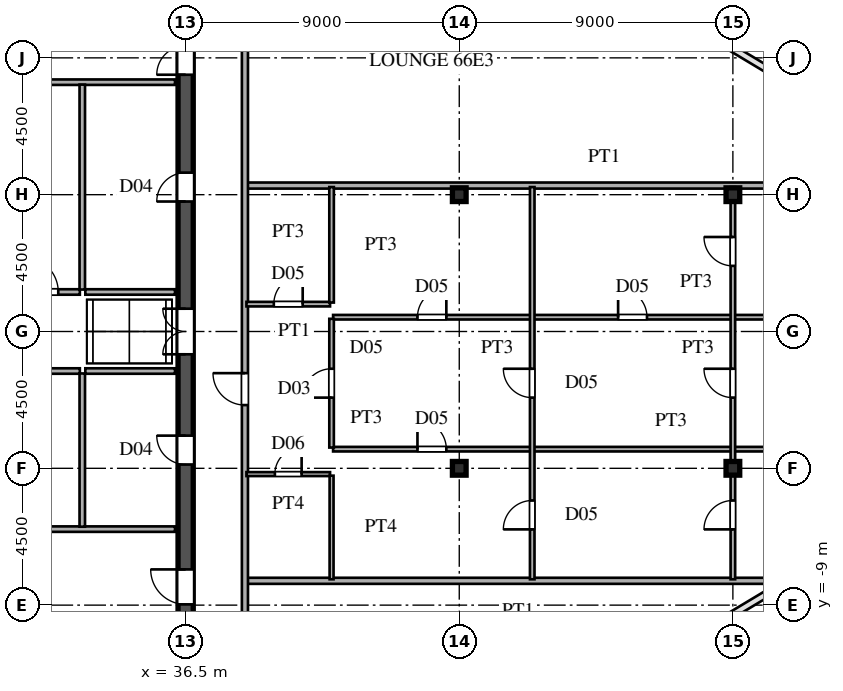
"""IFC4 building model, lengths in metres.
Left out: names, types, materials, properties, quantities, classifications, styles, units other than length and angle.
Written with IfcOpenShell. Run it as: python <this file> out.ifc"""

import sys

from ifc_helpers import new_model, si_unit, direction, frame, frame_2d, origin, origin_2d, place, context, subcontext, project, spatial, rectangle, i_section, extrude, source, transform, mapped, element, fill, save


model = new_model("IFC4")
c1 = context("Model", 3, precision=1e-05, world=origin(), true_north=direction((0.0, 1.0)))
c2 = subcontext(c1, "Body", "Model", "MODEL_VIEW")
j1 = project(units=[si_unit("LENGTHUNIT", "METRE"), si_unit("PLANEANGLEUNIT", "RADIAN")], contexts=[c1])
p1 = place(None, origin())
s1 = spatial("IfcSite", under=j1, at=p1, CompositionType="ELEMENT")
p2 = place(p1, origin())
s2 = spatial("IfcBuilding", under=s1, at=p2, CompositionType="ELEMENT")
p3 = place(p2, frame((0.0, 0.0, 250.65)))
s3 = spatial("IfcBuildingStorey", under=s2, at=p3, CompositionType="ELEMENT", Elevation=250.65)
m1 = source(origin(), c2, "Body", "SweptSolid", [
    extrude(i_section(OverallWidth=0.45, OverallDepth=0.45, WebThickness=0.016, FlangeThickness=0.025, at=origin_2d()), origin(), (0.0, 0.0, 1.0), 3.75),
])
for number, where, z_axis, x_axis in (
    (1, (45.5, -4.5, 0.0), (0.0, 0.0, 1.0), (1.0, 0.0, 0.0)),
    (2, (45.5, 4.5, 0.0), (0.0, 0.0, 1.0), (1.0, 0.0, 0.0)),
    (3, (54.5, -4.5, 0.0), (0.0, 0.0, 1.0), (1.0, 0.0, 0.0)),
    (4, (54.5, 4.5, 0.0), (0.0, 0.0, 1.0), (1.0, 0.0, 0.0)),
):
    element("IfcColumn", number, at=place(p3, frame(where, z_axis=z_axis, x_axis=x_axis)), inside=s3, PredefinedType="COLUMN", context=c2, shape_type="MappedRepresentation", body=[
        mapped(m1, transform((0.0, 0.0, 0.0), scale=1.0)),
    ])
p4 = place(p3, frame((36.5, -13.65, 0.0), z_axis=(0.0, 0.0, 1.0), x_axis=(0.0, 1.0, 0.0)))
e5 = element("IfcWall", 5, at=p4, inside=s3, PredefinedType="SHEAR", context=c2, shape_type="SweptSolid", body=[
    extrude(rectangle(XDim=7.15, YDim=0.5, at=frame_2d((3.575, 0.0))), origin(), (0.0, 0.0, 1.0), 3.53),
])
p5 = place(p4, frame((4.675, 0.0, 0.0)))
e6 = element("IfcOpeningElement", 6, at=p5, cuts=e5, PredefinedType="OPENING", context=c2, shape_type="SweptSolid", body=[
    extrude(rectangle(XDim=1.15, YDim=2.2, at=frame_2d((0.575, 1.1))), frame((0.0, 0.26, 0.0), z_axis=(0.0, -1.0, 0.0), x_axis=(1.0, 0.0, 0.0)), (0.0, 0.0, 1.0), 0.52),
])
p6 = place(p3, frame((36.5, -1.3, 0.0), z_axis=(0.0, 0.0, 1.0), x_axis=(0.0, 1.0, 0.0)))
e7 = element("IfcWall", 7, at=p6, inside=s3, PredefinedType="SHEAR", context=c2, shape_type="SweptSolid", body=[
    extrude(rectangle(XDim=2.6, YDim=0.5, at=frame_2d((1.3, 0.0))), origin(), (0.0, 0.0, 1.0), 3.53),
])
p7 = place(p6, frame((0.55, 0.0, 0.0)))
e8 = element("IfcOpeningElement", 8, at=p7, cuts=e7, PredefinedType="OPENING", context=c2, shape_type="SweptSolid", body=[
    extrude(rectangle(XDim=1.5, YDim=2.3, at=frame_2d((0.75, 1.15))), frame((0.0, 0.26, 0.0), z_axis=(0.0, -1.0, 0.0), x_axis=(1.0, 0.0, 0.0)), (0.0, 0.0, 1.0), 0.52),
])
p8 = place(p3, frame((36.5, 8.2, 0.0), z_axis=(0.0, 0.0, 1.0), x_axis=(0.0, 1.0, 0.0)))
e9 = element("IfcWall", 9, at=p8, inside=s3, PredefinedType="SHEAR", context=c2, shape_type="SweptSolid", body=[
    extrude(rectangle(XDim=5.45, YDim=0.5, at=frame_2d((2.725, 0.0))), origin(), (0.0, 0.0, 1.0), 3.53),
])
p9 = place(p8, frame((0.245, 0.0, 0.0)))
e10 = element("IfcOpeningElement", 10, at=p9, cuts=e9, PredefinedType="OPENING", context=c2, shape_type="SweptSolid", body=[
    extrude(rectangle(XDim=0.95, YDim=2.15, at=frame_2d((0.475, 1.075))), frame((0.0, 0.26, 0.0), z_axis=(0.0, -1.0, 0.0), x_axis=(1.0, 0.0, 0.0)), (0.0, 0.0, 1.0), 0.52),
])
p10 = place(p3, frame((36.5, -6.5, 0.0), z_axis=(0.0, 0.0, 1.0), x_axis=(0.0, 1.0, 0.0)))
e11 = element("IfcWall", 11, at=p10, inside=s3, PredefinedType="SHEAR", context=c2, shape_type="SweptSolid", body=[
    extrude(rectangle(XDim=5.2, YDim=0.5, at=frame_2d((2.6, 0.0))), origin(), (0.0, 0.0, 1.0), 3.53),
])
p11 = place(p10, frame((2.125, 0.0, 0.0)))
e12 = element("IfcOpeningElement", 12, at=p11, cuts=e11, PredefinedType="OPENING", context=c2, shape_type="SweptSolid", body=[
    extrude(rectangle(XDim=0.95, YDim=2.15, at=frame_2d((0.475, 1.075))), frame((0.0, 0.26, 0.0), z_axis=(0.0, -1.0, 0.0), x_axis=(1.0, 0.0, 0.0)), (0.0, 0.0, 1.0), 0.52),
])
p12 = place(p3, frame((36.5, 1.3, 0.0), z_axis=(0.0, 0.0, 1.0), x_axis=(0.0, 1.0, 0.0)))
e13 = element("IfcWall", 13, at=p12, inside=s3, PredefinedType="SHEAR", context=c2, shape_type="SweptSolid", body=[
    extrude(rectangle(XDim=6.9, YDim=0.5, at=frame_2d((3.45, 0.0))), origin(), (0.0, 0.0, 1.0), 3.53),
])
p13 = place(p12, frame((2.975, 0.0, 0.0)))
e14 = element("IfcOpeningElement", 14, at=p13, cuts=e13, PredefinedType="OPENING", context=c2, shape_type="SweptSolid", body=[
    extrude(rectangle(XDim=0.95, YDim=2.15, at=frame_2d((0.475, 1.075))), frame((0.0, 0.26, 0.0), z_axis=(0.0, -1.0, 0.0), x_axis=(1.0, 0.0, 0.0)), (0.0, 0.0, 1.0), 0.52),
])
for number, where, z_axis, x_axis in (
    (15, (30.45, -6.5, 0.0), (0.0, 0.0, 1.0), (1.0, 0.0, 0.0)),
    (16, (30.45, 8.2, 0.0), (0.0, 0.0, 1.0), (1.0, 0.0, 0.0)),
):
    element("IfcWall", number, at=place(p3, frame(where, z_axis=z_axis, x_axis=x_axis)), inside=s3, PredefinedType="PARTITIONING", context=c2, shape_type="SweptSolid", body=[
        extrude(rectangle(XDim=5.7, YDim=0.18, at=frame_2d((2.85, 0.0))), origin(), (0.0, 0.0, 1.0), 3.53),
    ])
p14 = place(p3, frame((33.1, -6.42, 0.0), z_axis=(0.0, 0.0, 1.0), x_axis=(0.0, 1.0, 0.0)))
e17 = element("IfcWall", 17, at=p14, inside=s3, PredefinedType="PARTITIONING", context=c2, shape_type="SweptSolid", body=[
    extrude(rectangle(XDim=5.04, YDim=0.18, at=frame_2d((2.52, 0.0))), origin(), (0.0, 0.0, 1.0), 3.53),
])
p15 = place(p3, frame((33.1, 1.38, 0.0), z_axis=(0.0, 0.0, 1.0), x_axis=(0.0, 1.0, 0.0)))
e18 = element("IfcWall", 18, at=p15, inside=s3, PredefinedType="PARTITIONING", context=c2, shape_type="SweptSolid", body=[
    extrude(rectangle(XDim=6.74, YDim=0.18, at=frame_2d((3.37, 0.0))), origin(), (0.0, 0.0, 1.0), 3.53),
])
p16 = place(p3, frame((27.85, -1.3, 0.0), z_axis=(0.0, 0.0, 1.0), x_axis=(1.0, 0.0, 0.0)))
e19 = element("IfcWall", 19, at=p16, inside=s3, PredefinedType="PARTITIONING", context=c2, shape_type="SweptSolid", body=[
    extrude(rectangle(XDim=5.17, YDim=0.18, at=frame_2d((2.585, 0.0))), origin(), (0.0, 0.0, 1.0), 3.53),
])
p17 = place(p16, frame((2.01, 0.0, 0.0)))
e20 = element("IfcOpeningElement", 20, at=p17, cuts=e19, PredefinedType="OPENING", context=c2, shape_type="SweptSolid", body=[
    extrude(rectangle(XDim=1.15, YDim=2.2, at=frame_2d((0.575, 1.1))), frame((0.0, 0.1, 0.0), z_axis=(0.0, -1.0, 0.0), x_axis=(1.0, 0.0, 0.0)), (0.0, 0.0, 1.0), 0.2),
])
p18 = place(p3, frame((30.45, 1.3, 0.0), z_axis=(0.0, 0.0, 1.0), x_axis=(1.0, 0.0, 0.0)))
e21 = element("IfcWall", 21, at=p18, inside=s3, PredefinedType="PARTITIONING", context=c2, shape_type="SweptSolid", body=[
    extrude(rectangle(XDim=2.57, YDim=0.18, at=frame_2d((1.285, 0.0))), origin(), (0.0, 0.0, 1.0), 3.53),
])
p19 = place(p18, frame((0.71, 0.0, 0.0)))
e22 = element("IfcOpeningElement", 22, at=p19, cuts=e21, PredefinedType="OPENING", context=c2, shape_type="SweptSolid", body=[
    extrude(rectangle(XDim=1.15, YDim=2.2, at=frame_2d((0.575, 1.1))), frame((0.0, 0.1, 0.0), z_axis=(0.0, -1.0, 0.0), x_axis=(1.0, 0.0, 0.0)), (0.0, 0.0, 1.0), 0.2),
])
for number, where, z_axis, x_axis in (
    (23, (33.2, -1.3, 0.0), (0.0, 0.0, 1.0), (1.0, 0.0, 0.0)),
    (24, (33.2, 1.3, 0.0), (0.0, 0.0, 1.0), (1.0, 0.0, 0.0)),
):
    element("IfcWall", number, at=place(p3, frame(where, z_axis=z_axis, x_axis=x_axis)), inside=s3, PredefinedType="PARTITIONING", context=c2, shape_type="SweptSolid", body=[
        extrude(rectangle(XDim=2.95, YDim=0.18, at=frame_2d((1.475, 0.0))), origin(), (0.0, 0.0, 1.0), 3.53),
    ])
p20 = place(p3, frame((38.53, -8.2, 0.0), z_axis=(0.0, 0.0, 1.0), x_axis=(1.0, 0.0, 0.0)))
e25 = element("IfcWall", 25, at=p20, inside=s3, PredefinedType="PARTITIONING", context=c2, shape_type="SweptSolid", body=[
    extrude(rectangle(XDim=17.813, YDim=0.2, at=frame_2d((8.906, 0.0))), origin(), (0.0, 0.0, 1.0), 3.53),
])
p21 = place(p3, frame((38.5, -4.69, 0.0), z_axis=(0.0, 0.0, 1.0), x_axis=(1.0, 0.0, 0.0)))
e26 = element("IfcWall", 26, at=p21, inside=s3, PredefinedType="PARTITIONING", context=c2, shape_type="SweptSolid", body=[
    extrude(rectangle(XDim=2.75, YDim=0.13, at=frame_2d((1.375, 0.0))), origin(), (0.0, 0.0, 1.0), 3.53),
])
p22 = place(p21, frame((0.935, 0.0, 0.0)))
e27 = element("IfcOpeningElement", 27, at=p22, cuts=e26, PredefinedType="OPENING", context=c2, shape_type="SweptSolid", body=[
    extrude(rectangle(XDim=0.88, YDim=2.1, at=frame_2d((0.44, 1.05))), frame((0.0, 0.075, 0.0), z_axis=(0.0, -1.0, 0.0), x_axis=(1.0, 0.0, 0.0)), (0.0, 0.0, 1.0), 0.15),
])
p23 = place(p3, frame((41.35, -3.87, 0.0), z_axis=(0.0, 0.0, 1.0), x_axis=(1.0, 0.0, 0.0)))
e28 = element("IfcWall", 28, at=p23, inside=s3, PredefinedType="PARTITIONING", context=c2, shape_type="SweptSolid", body=[
    extrude(rectangle(XDim=22.24, YDim=0.15, at=frame_2d((11.12, 0.0))), origin(), (0.0, 0.0, 1.0), 3.53),
])
p24 = place(p23, frame((2.775, 0.0, 0.0)))
e29 = element("IfcOpeningElement", 29, at=p24, cuts=e28, PredefinedType="OPENING", context=c2, shape_type="SweptSolid", body=[
    extrude(rectangle(XDim=0.95, YDim=2.15, at=frame_2d((0.475, 1.075))), frame((0.0, 0.085, 0.0), z_axis=(0.0, -1.0, 0.0), x_axis=(1.0, 0.0, 0.0)), (0.0, 0.0, 1.0), 0.17),
])
p25 = place(p3, frame((41.35, 0.47, 0.0), z_axis=(0.0, 0.0, 1.0), x_axis=(1.0, 0.0, 0.0)))
e30 = element("IfcWall", 30, at=p25, inside=s3, PredefinedType="PARTITIONING", context=c2, shape_type="SweptSolid", body=[
    extrude(rectangle(XDim=26.185, YDim=0.15, at=frame_2d((13.092, 0.0))), origin(), (0.0, 0.0, 1.0), 3.53),
])
p26 = place(p25, frame((2.775, 0.0, 0.0)))
e31 = element("IfcOpeningElement", 31, at=p26, cuts=e30, PredefinedType="OPENING", context=c2, shape_type="SweptSolid", body=[
    extrude(rectangle(XDim=0.95, YDim=2.15, at=frame_2d((0.475, 1.075))), frame((0.0, 0.085, 0.0), z_axis=(0.0, -1.0, 0.0), x_axis=(1.0, 0.0, 0.0)), (0.0, 0.0, 1.0), 0.17),
])
p27 = place(p25, frame((9.375, 0.0, 0.0)))
e32 = element("IfcOpeningElement", 32, at=p27, cuts=e30, PredefinedType="OPENING", context=c2, shape_type="SweptSolid", body=[
    extrude(rectangle(XDim=0.95, YDim=2.15, at=frame_2d((0.475, 1.075))), frame((0.0, 0.085, 0.0), z_axis=(0.0, -1.0, 0.0), x_axis=(1.0, 0.0, 0.0)), (0.0, 0.0, 1.0), 0.17),
])
p28 = place(p3, frame((38.5, 0.9, 0.0), z_axis=(0.0, 0.0, 1.0), x_axis=(1.0, 0.0, 0.0)))
e33 = element("IfcWall", 33, at=p28, inside=s3, PredefinedType="PARTITIONING", context=c2, shape_type="SweptSolid", body=[
    extrude(rectangle(XDim=2.75, YDim=0.15, at=frame_2d((1.375, 0.0))), origin(), (0.0, 0.0, 1.0), 3.53),
])
p29 = place(p28, frame((0.9, 0.0, 0.0)))
e34 = element("IfcOpeningElement", 34, at=p29, cuts=e33, PredefinedType="OPENING", context=c2, shape_type="SweptSolid", body=[
    extrude(rectangle(XDim=0.95, YDim=2.15, at=frame_2d((0.475, 1.075))), frame((0.0, 0.085, 0.0), z_axis=(0.0, -1.0, 0.0), x_axis=(1.0, 0.0, 0.0)), (0.0, 0.0, 1.0), 0.17),
])
p30 = place(p3, frame((38.53, 4.8, 0.0), z_axis=(0.0, 0.0, 1.0), x_axis=(1.0, 0.0, 0.0)))
e35 = element("IfcWall", 35, at=p30, inside=s3, PredefinedType="PARTITIONING", context=c2, shape_type="SweptSolid", body=[
    extrude(rectangle(XDim=23.48, YDim=0.2, at=frame_2d((11.74, 0.0))), origin(), (0.0, 0.0, 1.0), 3.53),
])
p31 = place(p3, frame((38.45, -15.515, 0.0), z_axis=(0.0, 0.0, 1.0), x_axis=(0.0, 1.0, 0.0)))
e36 = element("IfcWall", 36, at=p31, inside=s3, PredefinedType="PARTITIONING", context=c2, shape_type="SweptSolid", body=[
    extrude(rectangle(XDim=31.03, YDim=0.2, at=frame_2d((15.515, 0.0))), origin(), (0.0, 0.0, 1.0), 3.53),
])
p32 = place(p31, frame((3.09, 0.0, 0.0)))
e37 = element("IfcOpeningElement", 37, at=p32, cuts=e36, PredefinedType="OPENING", context=c2, shape_type="SweptSolid", body=[
    extrude(rectangle(XDim=1.05, YDim=2.25, at=frame_2d((0.525, 1.125))), frame((0.0, 0.11, 0.0), z_axis=(0.0, -1.0, 0.0), x_axis=(1.0, 0.0, 0.0)), (0.0, 0.0, 1.0), 0.22),
])
p33 = place(p31, frame((13.095, 0.0, 0.0)))
e38 = element("IfcOpeningElement", 38, at=p33, cuts=e36, PredefinedType="OPENING", context=c2, shape_type="SweptSolid", body=[
    extrude(rectangle(XDim=1.05, YDim=2.25, at=frame_2d((0.525, 1.125))), frame((0.0, 0.11, 0.0), z_axis=(0.0, -1.0, 0.0), x_axis=(1.0, 0.0, 0.0)), (0.0, 0.0, 1.0), 0.22),
])
p34 = place(p31, frame((25.19, 0.0, 0.0)))
e39 = element("IfcOpeningElement", 39, at=p34, cuts=e36, PredefinedType="OPENING", context=c2, shape_type="SweptSolid", body=[
    extrude(rectangle(XDim=1.05, YDim=2.25, at=frame_2d((0.525, 1.125))), frame((0.0, 0.11, 0.0), z_axis=(0.0, -1.0, 0.0), x_axis=(1.0, 0.0, 0.0)), (0.0, 0.0, 1.0), 0.22),
])
p35 = place(p3, frame((41.3, -8.15, 0.0), z_axis=(0.0, 0.0, 1.0), x_axis=(0.0, 1.0, 0.0)))
e40 = element("IfcWall", 40, at=p35, inside=s3, PredefinedType="PARTITIONING", context=c2, shape_type="SweptSolid", body=[
    extrude(rectangle(XDim=3.408, YDim=0.13, at=frame_2d((1.704, 0.0))), origin(), (0.0, 0.0, 1.0), 3.53),
])
p36 = place(p3, frame((41.3, -3.817, 0.0), z_axis=(0.0, 0.0, 1.0), x_axis=(0.0, 1.0, 0.0)))
e41 = element("IfcWall", 41, at=p36, inside=s3, PredefinedType="PARTITIONING", context=c2, shape_type="SweptSolid", body=[
    extrude(rectangle(XDim=4.234, YDim=0.15, at=frame_2d((2.117, 0.0))), origin(), (0.0, 0.0, 1.0), 3.53),
])
p37 = place(p36, frame((1.642, 0.0, 0.0)))
e42 = element("IfcOpeningElement", 42, at=p37, cuts=e41, PredefinedType="OPENING", context=c2, shape_type="SweptSolid", body=[
    extrude(rectangle(XDim=0.95, YDim=2.15, at=frame_2d((0.475, 1.075))), frame((0.0, 0.085, 0.0), z_axis=(0.0, -1.0, 0.0), x_axis=(1.0, 0.0, 0.0)), (0.0, 0.0, 1.0), 0.17),
])
p38 = place(p3, frame((41.3, 0.952, 0.0), z_axis=(0.0, 0.0, 1.0), x_axis=(0.0, 1.0, 0.0)))
e43 = element("IfcWall", 43, at=p38, inside=s3, PredefinedType="PARTITIONING", context=c2, shape_type="SweptSolid", body=[
    extrude(rectangle(XDim=3.798, YDim=0.15, at=frame_2d((1.899, 0.0))), origin(), (0.0, 0.0, 1.0), 3.53),
])
p39 = place(p3, frame((47.9, -8.15, 0.0), z_axis=(0.0, 0.0, 1.0), x_axis=(0.0, 1.0, 0.0)))
e44 = element("IfcWall", 44, at=p39, inside=s3, PredefinedType="PARTITIONING", context=c2, shape_type="SweptSolid", body=[
    extrude(rectangle(XDim=12.9, YDim=0.15, at=frame_2d((6.45, 0.0))), origin(), (0.0, 0.0, 1.0), 3.53),
])
p40 = place(p39, frame((5.975, 0.0, 0.0)))
e45 = element("IfcOpeningElement", 45, at=p40, cuts=e44, PredefinedType="OPENING", context=c2, shape_type="SweptSolid", body=[
    extrude(rectangle(XDim=0.95, YDim=2.15, at=frame_2d((0.475, 1.075))), frame((0.0, 0.085, 0.0), z_axis=(0.0, -1.0, 0.0), x_axis=(1.0, 0.0, 0.0)), (0.0, 0.0, 1.0), 0.17),
])
p41 = place(p39, frame((1.642, 0.0, 0.0)))
e46 = element("IfcOpeningElement", 46, at=p41, cuts=e44, PredefinedType="OPENING", context=c2, shape_type="SweptSolid", body=[
    extrude(rectangle(XDim=0.95, YDim=2.15, at=frame_2d((0.475, 1.075))), frame((0.0, 0.085, 0.0), z_axis=(0.0, -1.0, 0.0), x_axis=(1.0, 0.0, 0.0)), (0.0, 0.0, 1.0), 0.17),
])
p42 = place(p3, frame((54.5, -8.15, 0.0), z_axis=(0.0, 0.0, 1.0), x_axis=(0.0, 1.0, 0.0)))
e47 = element("IfcWall", 47, at=p42, inside=s3, PredefinedType="PARTITIONING", context=c2, shape_type="SweptSolid", body=[
    extrude(rectangle(XDim=12.9, YDim=0.15, at=frame_2d((6.45, 0.0))), origin(), (0.0, 0.0, 1.0), 2.93),
])
p43 = place(p42, frame((5.975, 0.0, 0.0)))
e48 = element("IfcOpeningElement", 48, at=p43, cuts=e47, PredefinedType="OPENING", context=c2, shape_type="SweptSolid", body=[
    extrude(rectangle(XDim=0.95, YDim=2.15, at=frame_2d((0.475, 1.075))), frame((0.0, 0.085, 0.0), z_axis=(0.0, -1.0, 0.0), x_axis=(1.0, 0.0, 0.0)), (0.0, 0.0, 1.0), 0.17),
])
p44 = place(p42, frame((1.642, 0.0, 0.0)))
e49 = element("IfcOpeningElement", 49, at=p44, cuts=e47, PredefinedType="OPENING", context=c2, shape_type="SweptSolid", body=[
    extrude(rectangle(XDim=0.95, YDim=2.15, at=frame_2d((0.475, 1.075))), frame((0.0, 0.085, 0.0), z_axis=(0.0, -1.0, 0.0), x_axis=(1.0, 0.0, 0.0)), (0.0, 0.0, 1.0), 0.17),
])
p45 = place(p42, frame((10.308, 0.0, 0.0)))
e50 = element("IfcOpeningElement", 50, at=p45, cuts=e47, PredefinedType="OPENING", context=c2, shape_type="SweptSolid", body=[
    extrude(rectangle(XDim=0.95, YDim=2.15, at=frame_2d((0.475, 1.075))), frame((0.0, 0.085, 0.0), z_axis=(0.0, -1.0, 0.0), x_axis=(1.0, 0.0, 0.0)), (0.0, 0.0, 1.0), 0.17),
])
m2 = source(origin(), c2, "Body", "SweptSolid", [
    extrude(rectangle(XDim=1.15, YDim=2.2, at=frame_2d((0.575, 1.1))), frame((0.0, 0.025, 0.0), z_axis=(0.0, -1.0, 0.0), x_axis=(1.0, 0.0, 0.0)), (0.0, 0.0, 1.0), 0.05),
])
p46 = place(p5, origin())
e51 = element("IfcDoor", 51, at=p46, inside=s3, OperationType="SINGLE_SWING_RIGHT", PredefinedType="DOOR", context=c2, shape_type="MappedRepresentation", body=[
    mapped(m2, transform((0.0, 0.0, 0.0), scale=1.0)),
])
fill(e6, e51)
m3 = source(origin(), c2, "Body", "SweptSolid", [
    extrude(rectangle(XDim=1.5, YDim=2.3, at=frame_2d((0.75, 1.15))), frame((0.0, 0.025, 0.0), z_axis=(0.0, -1.0, 0.0), x_axis=(1.0, 0.0, 0.0)), (0.0, 0.0, 1.0), 0.05),
])
p47 = place(p7, origin())
e52 = element("IfcDoor", 52, at=p47, inside=s3, OperationType="DOUBLE_SWING_LEFT", PredefinedType="DOOR", context=c2, shape_type="MappedRepresentation", body=[
    mapped(m3, transform((0.0, 0.0, 0.0), scale=1.0)),
])
fill(e8, e52)
m4 = source(origin(), c2, "Body", "SweptSolid", [
    extrude(rectangle(XDim=0.95, YDim=2.15, at=frame_2d((0.475, 1.075))), frame((0.0, 0.025, 0.0), z_axis=(0.0, -1.0, 0.0), x_axis=(1.0, 0.0, 0.0)), (0.0, 0.0, 1.0), 0.05),
])
p48 = place(p9, origin())
e53 = element("IfcDoor", 53, at=p48, inside=s3, OperationType="SINGLE_SWING_LEFT", PredefinedType="DOOR", context=c2, shape_type="MappedRepresentation", body=[
    mapped(m4, transform((0.0, 0.0, 0.0), scale=1.0)),
])
fill(e10, e53)
p49 = place(p11, origin())
e54 = element("IfcDoor", 54, at=p49, inside=s3, OperationType="SINGLE_SWING_RIGHT", PredefinedType="DOOR", context=c2, shape_type="MappedRepresentation", body=[
    mapped(m4, transform((0.0, 0.0, 0.0), scale=1.0)),
])
fill(e12, e54)
p50 = place(p13, origin())
e55 = element("IfcDoor", 55, at=p50, inside=s3, OperationType="SINGLE_SWING_LEFT", PredefinedType="DOOR", context=c2, shape_type="MappedRepresentation", body=[
    mapped(m4, transform((0.0, 0.0, 0.0), scale=1.0)),
])
fill(e14, e55)
p51 = place(p19, origin())
e56 = element("IfcDoor", 56, at=p51, inside=s3, OperationType="SINGLE_SWING_LEFT", PredefinedType="DOOR", context=c2, shape_type="MappedRepresentation", body=[
    mapped(m2, transform((0.0, 0.0, 0.0), scale=1.0)),
])
fill(e22, e56)
m5 = source(origin(), c2, "Body", "SweptSolid", [
    extrude(rectangle(XDim=0.88, YDim=2.1, at=frame_2d((0.44, 1.05))), frame((0.0, 0.025, 0.0), z_axis=(0.0, -1.0, 0.0), x_axis=(1.0, 0.0, 0.0)), (0.0, 0.0, 1.0), 0.05),
])
p52 = place(p22, origin())
e57 = element("IfcDoor", 57, at=p52, inside=s3, OperationType="SINGLE_SWING_RIGHT", PredefinedType="DOOR", context=c2, shape_type="MappedRepresentation", body=[
    mapped(m5, transform((0.0, 0.0, 0.0), scale=1.0)),
])
fill(e27, e57)
m6 = source(origin(), c2, "Body", "SweptSolid", [
    extrude(rectangle(XDim=0.95, YDim=2.15, at=frame_2d((0.475, 1.075))), frame((0.0, 0.025, 0.0), z_axis=(0.0, -1.0, 0.0), x_axis=(1.0, 0.0, 0.0)), (0.0, 0.0, 1.0), 0.05),
])
p53 = place(p24, origin())
e58 = element("IfcDoor", 58, at=p53, inside=s3, OperationType="SINGLE_SWING_LEFT", PredefinedType="DOOR", context=c2, shape_type="MappedRepresentation", body=[
    mapped(m6, transform((0.0, 0.0, 0.0), scale=1.0)),
])
fill(e29, e58)
p54 = place(p26, origin())
e59 = element("IfcDoor", 59, at=p54, inside=s3, OperationType="SINGLE_SWING_RIGHT", PredefinedType="DOOR", context=c2, shape_type="MappedRepresentation", body=[
    mapped(m6, transform((0.0, 0.0, 0.0), scale=1.0)),
])
fill(e31, e59)
p55 = place(p27, origin())
e60 = element("IfcDoor", 60, at=p55, inside=s3, OperationType="SINGLE_SWING_LEFT", PredefinedType="DOOR", context=c2, shape_type="MappedRepresentation", body=[
    mapped(m6, transform((0.0, 0.0, 0.0), scale=1.0)),
])
fill(e32, e60)
p56 = place(p29, origin())
e61 = element("IfcDoor", 61, at=p56, inside=s3, OperationType="SINGLE_SWING_RIGHT", PredefinedType="DOOR", context=c2, shape_type="MappedRepresentation", body=[
    mapped(m6, transform((0.0, 0.0, 0.0), scale=1.0)),
])
fill(e34, e61)
m7 = source(origin(), c2, "Body", "SweptSolid", [
    extrude(rectangle(XDim=1.05, YDim=2.25, at=frame_2d((0.525, 1.125))), frame((0.0, 0.025, 0.0), z_axis=(0.0, -1.0, 0.0), x_axis=(1.0, 0.0, 0.0)), (0.0, 0.0, 1.0), 0.05),
])
p57 = place(p33, origin())
e62 = element("IfcDoor", 62, at=p57, inside=s3, OperationType="SINGLE_SWING_RIGHT", PredefinedType="DOOR", context=c2, shape_type="MappedRepresentation", body=[
    mapped(m7, transform((0.0, 0.0, 0.0), scale=1.0)),
])
fill(e38, e62)
p58 = place(p37, origin())
e63 = element("IfcDoor", 63, at=p58, inside=s3, OperationType="SINGLE_SWING_LEFT", PredefinedType="DOOR", context=c2, shape_type="MappedRepresentation", body=[
    mapped(m6, transform((0.0, 0.0, 0.0), scale=1.0)),
])
fill(e42, e63)
p59 = place(p40, origin())
e64 = element("IfcDoor", 64, at=p59, inside=s3, OperationType="SINGLE_SWING_RIGHT", PredefinedType="DOOR", context=c2, shape_type="MappedRepresentation", body=[
    mapped(m6, transform((0.0, 0.0, 0.0), scale=1.0)),
])
fill(e45, e64)
p60 = place(p41, origin())
e65 = element("IfcDoor", 65, at=p60, inside=s3, OperationType="SINGLE_SWING_LEFT", PredefinedType="DOOR", context=c2, shape_type="MappedRepresentation", body=[
    mapped(m6, transform((0.0, 0.0, 0.0), scale=1.0)),
])
fill(e46, e65)
p61 = place(p43, origin())
e66 = element("IfcDoor", 66, at=p61, inside=s3, OperationType="SINGLE_SWING_RIGHT", PredefinedType="DOOR", context=c2, shape_type="MappedRepresentation", body=[
    mapped(m6, transform((0.0, 0.0, 0.0), scale=1.0)),
])
fill(e48, e66)
p62 = place(p44, origin())
e67 = element("IfcDoor", 67, at=p62, inside=s3, OperationType="SINGLE_SWING_LEFT", PredefinedType="DOOR", context=c2, shape_type="MappedRepresentation", body=[
    mapped(m6, transform((0.0, 0.0, 0.0), scale=1.0)),
])
fill(e49, e67)
p63 = place(p45, origin())
e68 = element("IfcDoor", 68, at=p63, inside=s3, OperationType="SINGLE_SWING_RIGHT", PredefinedType="DOOR", context=c2, shape_type="MappedRepresentation", body=[
    mapped(m6, transform((0.0, 0.0, 0.0), scale=1.0)),
])
fill(e50, e68)
save(model, sys.argv[1])
